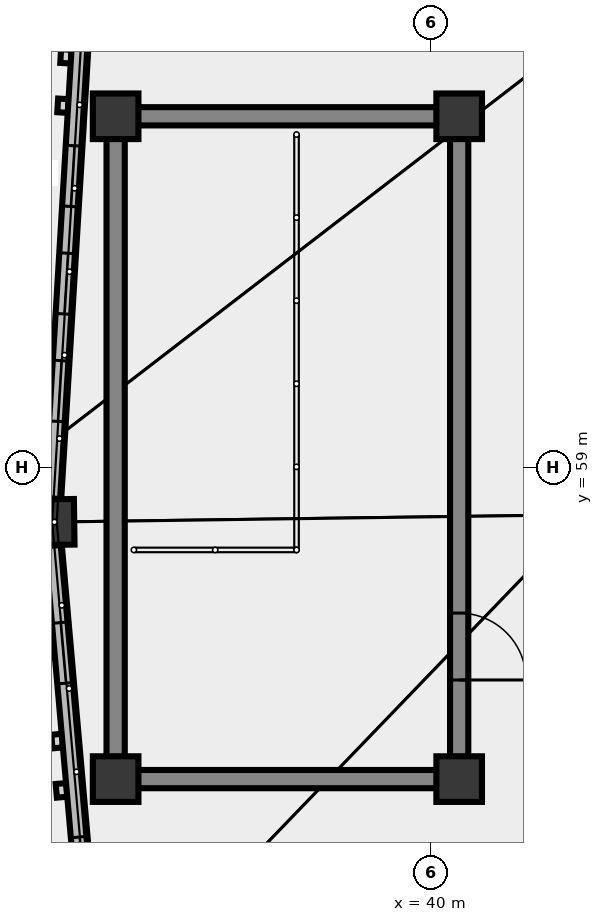
"""IFC4 building model, lengths in metres.
Left out: names, types, materials, properties, quantities, classifications, styles, units other than length and angle.
Written with IfcOpenShell. Run it as: python <this file> out.ifc"""

import sys

from ifc_helpers import new_model, si_unit, direction, frame, frame_2d, origin, origin_2d, place, context, subcontext, project, spatial, rectangle, extrude, element, fill, save


model = new_model("IFC4")
c1 = context("Model", 3, precision=1e-05, world=origin(), true_north=direction((0.0, 1.0)))
c2 = subcontext(c1, "Body", "Model", "MODEL_VIEW")
j1 = project(units=[si_unit("LENGTHUNIT", "METRE"), si_unit("PLANEANGLEUNIT", "RADIAN")], contexts=[c1])
p1 = place(None, origin())
s1 = spatial("IfcSite", under=j1, at=p1, CompositionType="ELEMENT")
p2 = place(p1, origin())
s2 = spatial("IfcBuilding", under=s1, at=p2, CompositionType="ELEMENT")
p3 = place(p2, frame((0.0, 0.0, 12.5)))
s3 = spatial("IfcBuildingStorey", under=s2, at=p3, CompositionType="ELEMENT", Elevation=12.5)
p4 = place(p3, frame((35.85, 54.9, 0.0), z_axis=(0.0, 0.0, 1.0), x_axis=(1.0, 0.0, 0.0)))
e1 = element("IfcColumn", 1, at=p4, inside=s3, PredefinedType="COLUMN", context=c2, shape_type="SweptSolid", body=[
    extrude(rectangle(XDim=0.6, YDim=0.6, at=origin_2d()), origin(), (0.0, 0.0, 1.0), 4.15),
])
p5 = place(p3, frame((40.37, 54.9, 0.0), z_axis=(0.0, 0.0, 1.0), x_axis=(1.0, 0.0, 0.0)))
e2 = element("IfcColumn", 2, at=p5, inside=s3, PredefinedType="COLUMN", context=c2, shape_type="SweptSolid", body=[
    extrude(rectangle(XDim=0.6, YDim=0.6, at=origin_2d()), origin(), (0.0, 0.0, 1.0), 3.159),
])
p6 = place(p3, frame((40.37, 63.62, 0.0), z_axis=(0.0, 0.0, 1.0), x_axis=(1.0, 0.0, 0.0)))
e3 = element("IfcColumn", 3, at=p6, inside=s3, PredefinedType="COLUMN", context=c2, shape_type="SweptSolid", body=[
    extrude(rectangle(XDim=0.6, YDim=0.6, at=origin_2d()), origin(), (0.0, 0.0, 1.0), 3.17),
])
p7 = place(p3, frame((35.85, 63.62, 0.0), z_axis=(0.0, 0.0, 1.0), x_axis=(1.0, 0.0, 0.0)))
e4 = element("IfcColumn", 4, at=p7, inside=s3, PredefinedType="COLUMN", context=c2, shape_type="SweptSolid", body=[
    extrude(rectangle(XDim=0.6, YDim=0.6, at=origin_2d()), origin(), (0.0, 0.0, 1.0), 4.15),
])
p8 = place(p3, frame((35.005, 58.281, 0.0), z_axis=(0.0, 0.0, 1.0), x_axis=(-0.999904463751, -0.013822567474, 0.0)))
e5 = element("IfcColumn", 5, at=p8, inside=s3, PredefinedType="COLUMN", context=c2, shape_type="SweptSolid", body=[
    extrude(rectangle(XDim=0.6, YDim=0.6, at=origin_2d()), origin(), (0.0, 0.0, 1.0), 4.16),
])
p9 = place(p3, frame((35.024, 58.591, 0.0), z_axis=(0.0, 0.0, 1.0), x_axis=(0.060150575124, 0.998189314866, 0.0)))
e6 = element("IfcWall", 6, at=p9, inside=s3, PredefinedType="SOLIDWALL", context=c2, shape_type="SweptSolid", body=[
    extrude(rectangle(XDim=7.083, YDim=0.22, at=frame_2d((3.542, 0.0))), origin(), (0.0, 0.0, 1.0), 3.537),
])
p10 = place(p9, frame((1.017, 0.0, 0.85)))
e7 = element("IfcOpeningElement", 7, at=p10, cuts=e6, PredefinedType="OPENING", context=c2, shape_type="SweptSolid", body=[
    extrude(rectangle(XDim=0.8, YDim=1.1, at=frame_2d((0.4, 0.55))), frame((0.0, 0.12, 0.0), z_axis=(0.0, -1.0, 0.0), x_axis=(1.0, 0.0, 0.0)), (0.0, 0.0, 1.0), 0.24),
])
p11 = place(p9, frame((2.433, 0.0, 0.85)))
e8 = element("IfcOpeningElement", 8, at=p11, cuts=e6, PredefinedType="OPENING", context=c2, shape_type="SweptSolid", body=[
    extrude(rectangle(XDim=0.8, YDim=1.1, at=frame_2d((0.4, 0.55))), frame((0.0, 0.12, 0.0), z_axis=(0.0, -1.0, 0.0), x_axis=(1.0, 0.0, 0.0)), (0.0, 0.0, 1.0), 0.24),
])
p12 = place(p9, frame((3.85, 0.0, 0.85)))
e9 = element("IfcOpeningElement", 9, at=p12, cuts=e6, PredefinedType="OPENING", context=c2, shape_type="SweptSolid", body=[
    extrude(rectangle(XDim=0.8, YDim=1.1, at=frame_2d((0.4, 0.55))), frame((0.0, 0.12, 0.0), z_axis=(0.0, -1.0, 0.0), x_axis=(1.0, 0.0, 0.0)), (0.0, 0.0, 1.0), 0.24),
])
p13 = place(p3, frame((35.655, 50.917, 0.0), z_axis=(0.0, 0.0, 1.0), x_axis=(-0.08798335938, 0.996121944579, 0.0)))
e10 = element("IfcWall", 10, at=p13, inside=s3, PredefinedType="SOLIDWALL", context=c2, shape_type="SweptSolid", body=[
    extrude(rectangle(XDim=7.081, YDim=0.22, at=frame_2d((3.541, 0.0))), origin(), (0.0, 0.0, 1.0), 3.537),
])
p14 = place(p13, frame((1.016, 0.0, 0.85)))
e11 = element("IfcOpeningElement", 11, at=p14, cuts=e10, PredefinedType="OPENING", context=c2, shape_type="SweptSolid", body=[
    extrude(rectangle(XDim=0.8, YDim=1.1, at=frame_2d((0.4, 0.55))), frame((0.0, 0.12, 0.0), z_axis=(0.0, -1.0, 0.0), x_axis=(1.0, 0.0, 0.0)), (0.0, 0.0, 1.0), 0.24),
])
p15 = place(p13, frame((2.433, 0.0, 0.85)))
e12 = element("IfcOpeningElement", 12, at=p15, cuts=e10, PredefinedType="OPENING", context=c2, shape_type="SweptSolid", body=[
    extrude(rectangle(XDim=0.8, YDim=1.1, at=frame_2d((0.4, 0.55))), frame((0.0, 0.12, 0.0), z_axis=(0.0, -1.0, 0.0), x_axis=(1.0, 0.0, 0.0)), (0.0, 0.0, 1.0), 0.24),
])
p16 = place(p13, frame((5.265, 0.0, 0.85)))
e13 = element("IfcOpeningElement", 13, at=p16, cuts=e10, PredefinedType="OPENING", context=c2, shape_type="SweptSolid", body=[
    extrude(rectangle(XDim=0.8, YDim=1.1, at=frame_2d((0.4, 0.55))), frame((0.0, 0.12, 0.0), z_axis=(0.0, -1.0, 0.0), x_axis=(1.0, 0.0, 0.0)), (0.0, 0.0, 1.0), 0.24),
])
p17 = place(p3, frame((35.85, 55.192, 0.0), z_axis=(0.0, 0.0, 1.0), x_axis=(0.0, 1.0, 0.0)))
e14 = element("IfcWall", 14, at=p17, inside=s3, PredefinedType="SHEAR", context=c2, shape_type="SweptSolid", body=[
    extrude(rectangle(XDim=8.136, YDim=0.24, at=frame_2d((4.068, 0.0))), origin(), (0.0, 0.0, 1.0), 3.74),
])
p18 = place(p3, frame((40.37, 63.328, 0.0), z_axis=(0.0, 0.0, 1.0), x_axis=(0.0, -1.0, 0.0)))
e15 = element("IfcWall", 15, at=p18, inside=s3, PredefinedType="SHEAR", context=c2, shape_type="SweptSolid", body=[
    extrude(rectangle(XDim=8.136, YDim=0.24, at=frame_2d((4.068, 0.0))), origin(), (0.0, 0.0, 1.0), 3.254),
])
p19 = place(p18, frame((6.244, 0.0, 0.0)))
e16 = element("IfcOpeningElement", 16, at=p19, cuts=e15, PredefinedType="OPENING", context=c2, shape_type="SweptSolid", body=[
    extrude(rectangle(XDim=0.88, YDim=2.1, at=frame_2d((0.44, 1.05))), frame((0.0, 0.13, 0.0), z_axis=(0.0, -1.0, 0.0), x_axis=(1.0, 0.0, 0.0)), (0.0, 0.0, 1.0), 0.26),
])
p20 = place(p3, frame((40.078, 54.9, 0.0), z_axis=(0.0, 0.0, 1.0), x_axis=(-1.0, 0.0, 0.0)))
e17 = element("IfcWall", 17, at=p20, inside=s3, PredefinedType="SHEAR", context=c2, shape_type="SweptSolid", body=[
    extrude(rectangle(XDim=3.936, YDim=0.24, at=frame_2d((1.968, 0.0))), origin(), (0.0, 0.0, 1.0), 3.325),
])
p21 = place(p3, frame((40.078, 63.62, 0.0), z_axis=(0.0, 0.0, 1.0), x_axis=(-1.0, 0.0, 0.0)))
e18 = element("IfcWall", 18, at=p21, inside=s3, PredefinedType="SHEAR", context=c2, shape_type="SweptSolid", body=[
    extrude(rectangle(XDim=3.936, YDim=0.24, at=frame_2d((1.968, 0.0))), origin(), (0.0, 0.0, 1.0), 3.336),
])
p22 = place(p10, origin())
e19 = element("IfcWindow", 19, at=p22, inside=s3, PartitioningType="SINGLE_PANEL", PredefinedType="WINDOW", context=c2, shape_type="SweptSolid", body=[
    extrude(rectangle(XDim=0.8, YDim=1.1, at=frame_2d((0.4, 0.55))), frame((0.0, 0.03, 0.0), z_axis=(0.0, -1.0, 0.0), x_axis=(1.0, 0.0, 0.0)), (0.0, 0.0, 1.0), 0.06),
])
fill(e7, e19)
p23 = place(p11, origin())
e20 = element("IfcWindow", 20, at=p23, inside=s3, PartitioningType="SINGLE_PANEL", PredefinedType="WINDOW", context=c2, shape_type="SweptSolid", body=[
    extrude(rectangle(XDim=0.8, YDim=1.1, at=frame_2d((0.4, 0.55))), frame((0.0, 0.03, 0.0), z_axis=(0.0, -1.0, 0.0), x_axis=(1.0, 0.0, 0.0)), (0.0, 0.0, 1.0), 0.06),
])
fill(e8, e20)
p24 = place(p12, origin())
e21 = element("IfcWindow", 21, at=p24, inside=s3, PartitioningType="SINGLE_PANEL", PredefinedType="WINDOW", context=c2, shape_type="SweptSolid", body=[
    extrude(rectangle(XDim=0.8, YDim=1.1, at=frame_2d((0.4, 0.55))), frame((0.0, 0.03, 0.0), z_axis=(0.0, -1.0, 0.0), x_axis=(1.0, 0.0, 0.0)), (0.0, 0.0, 1.0), 0.06),
])
fill(e9, e21)
p25 = place(p15, origin())
e22 = element("IfcWindow", 22, at=p25, inside=s3, PartitioningType="SINGLE_PANEL", PredefinedType="WINDOW", context=c2, shape_type="SweptSolid", body=[
    extrude(rectangle(XDim=0.8, YDim=1.1, at=frame_2d((0.4, 0.55))), frame((0.0, 0.03, 0.0), z_axis=(0.0, -1.0, 0.0), x_axis=(1.0, 0.0, 0.0)), (0.0, 0.0, 1.0), 0.06),
])
fill(e12, e22)
p26 = place(p16, origin())
e23 = element("IfcWindow", 23, at=p26, inside=s3, PartitioningType="SINGLE_PANEL", PredefinedType="WINDOW", context=c2, shape_type="SweptSolid", body=[
    extrude(rectangle(XDim=0.8, YDim=1.1, at=frame_2d((0.4, 0.55))), frame((0.0, 0.03, 0.0), z_axis=(0.0, -1.0, 0.0), x_axis=(1.0, 0.0, 0.0)), (0.0, 0.0, 1.0), 0.06),
])
fill(e13, e23)
p27 = place(p19, origin())
e24 = element("IfcDoor", 24, at=p27, inside=s3, OperationType="SINGLE_SWING_RIGHT", PredefinedType="DOOR", context=c2, shape_type="SweptSolid", body=[
    extrude(rectangle(XDim=0.88, YDim=2.1, at=frame_2d((0.44, 1.05))), frame((0.0, 0.025, 0.0), z_axis=(0.0, -1.0, 0.0), x_axis=(1.0, 0.0, 0.0)), (0.0, 0.0, 1.0), 0.05),
])
fill(e16, e24)
save(model, sys.argv[1])
